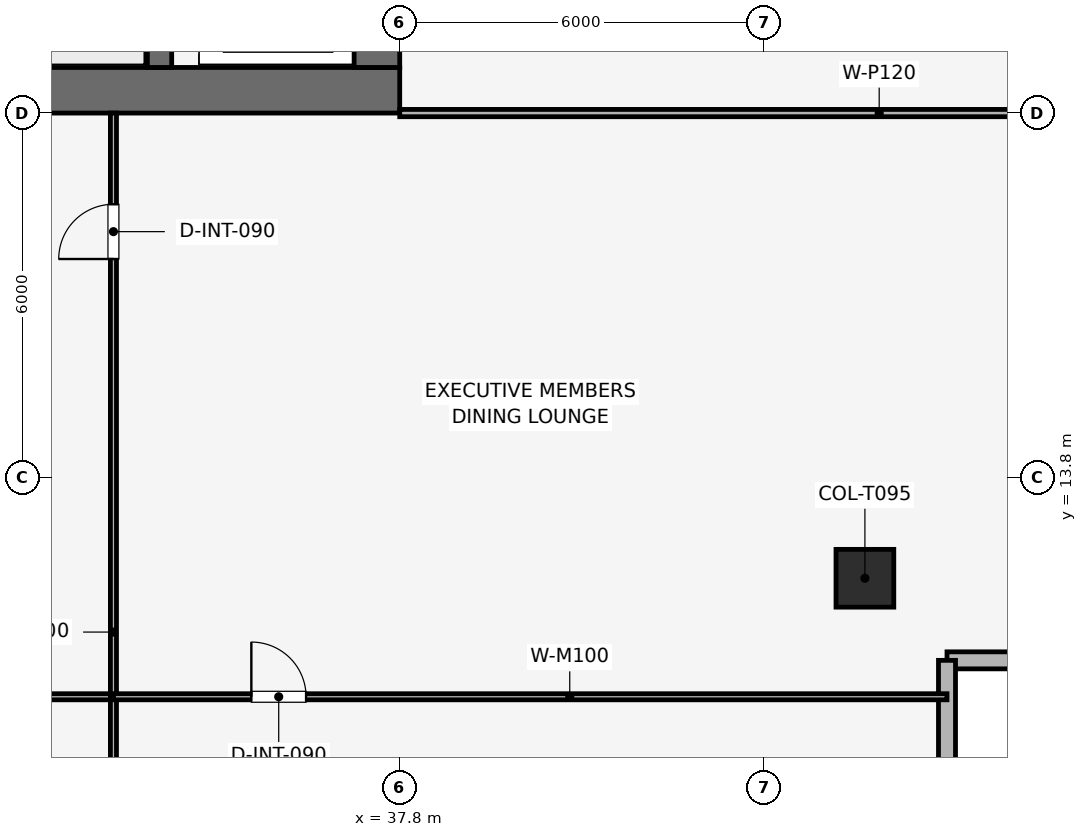
"""IFC4 building model, lengths in metres.
Left out: names, types, materials, properties, quantities, classifications, styles, units other than length and angle.
Written with IfcOpenShell. Run it as: python <this file> out.ifc"""

import sys

from ifc_helpers import new_model, si_unit, direction, frame, frame_2d, origin, origin_2d, place, context, subcontext, project, spatial, rectangle, extrude, element, fill, save


model = new_model("IFC4")
c1 = context("Model", 3, precision=1e-05, world=origin(), true_north=direction((0.0, 1.0)))
c2 = subcontext(c1, "Body", "Model", "MODEL_VIEW")
j1 = project(units=[si_unit("LENGTHUNIT", "METRE"), si_unit("PLANEANGLEUNIT", "RADIAN")], contexts=[c1])
p1 = place(None, origin())
s1 = spatial("IfcSite", under=j1, at=p1, CompositionType="ELEMENT")
p2 = place(p1, origin())
s2 = spatial("IfcBuilding", under=s1, at=p2, CompositionType="ELEMENT")
p3 = place(p2, frame((0.0, 0.0, 265.35)))
s3 = spatial("IfcBuildingStorey", under=s2, at=p3, CompositionType="ELEMENT", Elevation=265.35)
p4 = place(p3, frame((19.8, 20.175, 0.0), z_axis=(0.0, 0.0, 1.0), x_axis=(1.0, 0.0, 0.0)))
e1 = element("IfcWall", 1, at=p4, inside=s3, PredefinedType="SHEAR", context=c2, shape_type="SweptSolid", body=[
    extrude(rectangle(XDim=18.0, YDim=0.75, at=frame_2d((9.0, 0.0))), origin(), (0.0, 0.0, 1.0), 3.75),
])
p5 = place(p3, frame((37.425, 20.55, 0.0), z_axis=(0.0, 0.0, 1.0), x_axis=(0.0, 1.0, 0.0)))
e2 = element("IfcWall", 2, at=p5, inside=s3, PredefinedType="SHEAR", context=c2, shape_type="SweptSolid", body=[
    extrude(rectangle(XDim=16.5, YDim=0.75, at=frame_2d((8.25, 0.0))), origin(), (0.0, 0.0, 1.0), 3.75),
])
p6 = place(p5, frame((4.75, 0.0, 0.0)))
e3 = element("IfcOpeningElement", 3, at=p6, cuts=e2, PredefinedType="OPENING", context=c2, shape_type="SweptSolid", body=[
    extrude(rectangle(XDim=1.1, YDim=2.15, at=frame_2d((0.55, 1.075))), frame((0.0, 0.385, 0.0), z_axis=(0.0, -1.0, 0.0), x_axis=(1.0, 0.0, 0.0)), (0.0, 0.0, 1.0), 0.77),
])
p7 = place(p3, frame((33.85, 20.55, 0.0), z_axis=(0.0, 0.0, 1.0), x_axis=(0.0, 1.0, 0.0)))
e4 = element("IfcWall", 4, at=p7, inside=s3, PredefinedType="SHEAR", context=c2, shape_type="SweptSolid", body=[
    extrude(rectangle(XDim=16.5, YDim=0.4, at=frame_2d((8.25, 0.0))), origin(), (0.0, 0.0, 1.0), 3.75),
])
p8 = place(p3, frame((45.45, 12.15, 0.003), z_axis=(0.0, 0.0, 1.0), x_axis=(1.0, 0.0, 0.0)))
e5 = element("IfcColumn", 5, at=p8, inside=s3, PredefinedType="COLUMN", context=c2, shape_type="SweptSolid", body=[
    extrude(rectangle(XDim=0.95, YDim=0.95, at=origin_2d()), origin(), (0.0, 0.0, 1.0), 3.494),
])
p9 = place(p3, frame((53.57, 10.8, 0.0), z_axis=(0.0, 0.0, 1.0), x_axis=(-1.0, 0.0, 0.0)))
e6 = element("IfcWall", 6, at=p9, inside=s3, PredefinedType="SOLIDWALL", context=c2, shape_type="SweptSolid", body=[
    extrude(rectangle(XDim=6.77, YDim=0.28, at=frame_2d((3.385, 0.0))), origin(), (0.0, 0.0, 1.0), 3.5),
])
p10 = place(p9, frame((2.135, 0.0, 0.9)))
e7 = element("IfcOpeningElement", 7, at=p10, cuts=e6, PredefinedType="OPENING", context=c2, shape_type="SweptSolid", body=[
    extrude(rectangle(XDim=2.5, YDim=1.9, at=frame_2d((1.25, 0.95))), frame((0.0, 0.15, 0.0), z_axis=(0.0, -1.0, 0.0), x_axis=(1.0, 0.0, 0.0)), (0.0, 0.0, 1.0), 0.3),
])
p11 = place(p3, frame((46.8, 10.8, 0.0), z_axis=(0.0, 0.0, 1.0), x_axis=(0.0, -1.0, 0.0)))
e8 = element("IfcWall", 8, at=p11, inside=s3, PredefinedType="SOLIDWALL", context=c2, shape_type="SweptSolid", body=[
    extrude(rectangle(XDim=6.77, YDim=0.28, at=frame_2d((3.385, 0.0))), origin(), (0.0, 0.0, 1.0), 3.5),
])
p12 = place(p11, frame((2.135, 0.0, 0.9)))
e9 = element("IfcOpeningElement", 9, at=p12, cuts=e8, PredefinedType="OPENING", context=c2, shape_type="SweptSolid", body=[
    extrude(rectangle(XDim=2.5, YDim=1.9, at=frame_2d((1.25, 0.95))), frame((0.0, 0.15, 0.0), z_axis=(0.0, -1.0, 0.0), x_axis=(1.0, 0.0, 0.0)), (0.0, 0.0, 1.0), 0.3),
])
p13 = place(p3, frame((22.1, 10.201, 0.0), z_axis=(0.0, 0.0, 1.0), x_axis=(1.0, 0.0, 0.0)))
e10 = element("IfcWall", 10, at=p13, inside=s3, PredefinedType="MOVABLE", context=c2, shape_type="SweptSolid", body=[
    extrude(rectangle(XDim=10.992, YDim=0.1, at=frame_2d((5.496, 0.0))), origin(), (0.0, 0.0, 1.0), 3.085),
])
p14 = place(p13, frame((0.2, 0.0, 0.0)))
e11 = element("IfcOpeningElement", 11, at=p14, cuts=e10, PredefinedType="OPENING", context=c2, shape_type="SweptSolid", body=[
    extrude(rectangle(XDim=0.9, YDim=2.1, at=frame_2d((0.45, 1.05))), frame((0.0, 0.06, 0.0), z_axis=(0.0, -1.0, 0.0), x_axis=(1.0, 0.0, 0.0)), (0.0, 0.0, 1.0), 0.12),
])
p15 = place(p3, frame((33.092, 4.03, 0.0), z_axis=(0.0, 0.0, 1.0), x_axis=(0.0, 1.0, 0.0)))
e12 = element("IfcWall", 12, at=p15, inside=s3, PredefinedType="MOVABLE", context=c2, shape_type="SweptSolid", body=[
    extrude(rectangle(XDim=15.77, YDim=0.1, at=frame_2d((7.885, 0.0))), origin(), (0.0, 0.0, 1.0), 3.085),
])
p16 = place(p15, frame((13.37, 0.0, 0.0)))
e13 = element("IfcOpeningElement", 13, at=p16, cuts=e12, PredefinedType="OPENING", context=c2, shape_type="SweptSolid", body=[
    extrude(rectangle(XDim=0.9, YDim=2.1, at=frame_2d((0.45, 1.05))), frame((0.0, 0.06, 0.0), z_axis=(0.0, -1.0, 0.0), x_axis=(1.0, 0.0, 0.0)), (0.0, 0.0, 1.0), 0.12),
])
p17 = place(p3, frame((33.092, 10.201, 0.0), z_axis=(0.0, 0.0, 1.0), x_axis=(1.0, 0.0, 0.0)))
e14 = element("IfcWall", 14, at=p17, inside=s3, PredefinedType="MOVABLE", context=c2, shape_type="SweptSolid", body=[
    extrude(rectangle(XDim=13.708, YDim=0.1, at=frame_2d((6.854, 0.0))), origin(), (0.0, 0.0, 1.0), 3.085),
])
p18 = place(p17, frame((2.268, 0.0, 0.0)))
e15 = element("IfcOpeningElement", 15, at=p18, cuts=e14, PredefinedType="OPENING", context=c2, shape_type="SweptSolid", body=[
    extrude(rectangle(XDim=0.9, YDim=2.1, at=frame_2d((0.45, 1.05))), frame((0.0, 0.06, 0.0), z_axis=(0.0, -1.0, 0.0), x_axis=(1.0, 0.0, 0.0)), (0.0, 0.0, 1.0), 0.12),
])
p19 = place(p3, frame((37.8, 19.8, 0.0), z_axis=(0.0, 0.0, 1.0), x_axis=(1.0, 0.0, 0.0)))
e16 = element("IfcWall", 16, at=p19, inside=s3, PredefinedType="PARTITIONING", context=c2, shape_type="SweptSolid", body=[
    extrude(rectangle(XDim=15.77, YDim=0.12, at=frame_2d((7.885, 0.0))), origin(), (0.0, 0.0, 1.0), 3.085),
])
p20 = place(p16, origin())
e17 = element("IfcDoor", 17, at=p20, inside=s3, OperationType="SINGLE_SWING_LEFT", PredefinedType="DOOR", context=c2, shape_type="SweptSolid", body=[
    extrude(rectangle(XDim=0.9, YDim=2.1, at=frame_2d((0.45, 1.05))), frame((0.0, 0.025, 0.0), z_axis=(0.0, -1.0, 0.0), x_axis=(1.0, 0.0, 0.0)), (0.0, 0.0, 1.0), 0.05),
])
fill(e13, e17)
p21 = place(p18, origin())
e18 = element("IfcDoor", 18, at=p21, inside=s3, OperationType="SINGLE_SWING_LEFT", PredefinedType="DOOR", context=c2, shape_type="SweptSolid", body=[
    extrude(rectangle(XDim=0.9, YDim=2.1, at=frame_2d((0.45, 1.05))), frame((0.0, 0.025, 0.0), z_axis=(0.0, -1.0, 0.0), x_axis=(1.0, 0.0, 0.0)), (0.0, 0.0, 1.0), 0.05),
])
fill(e15, e18)
save(model, sys.argv[1])
